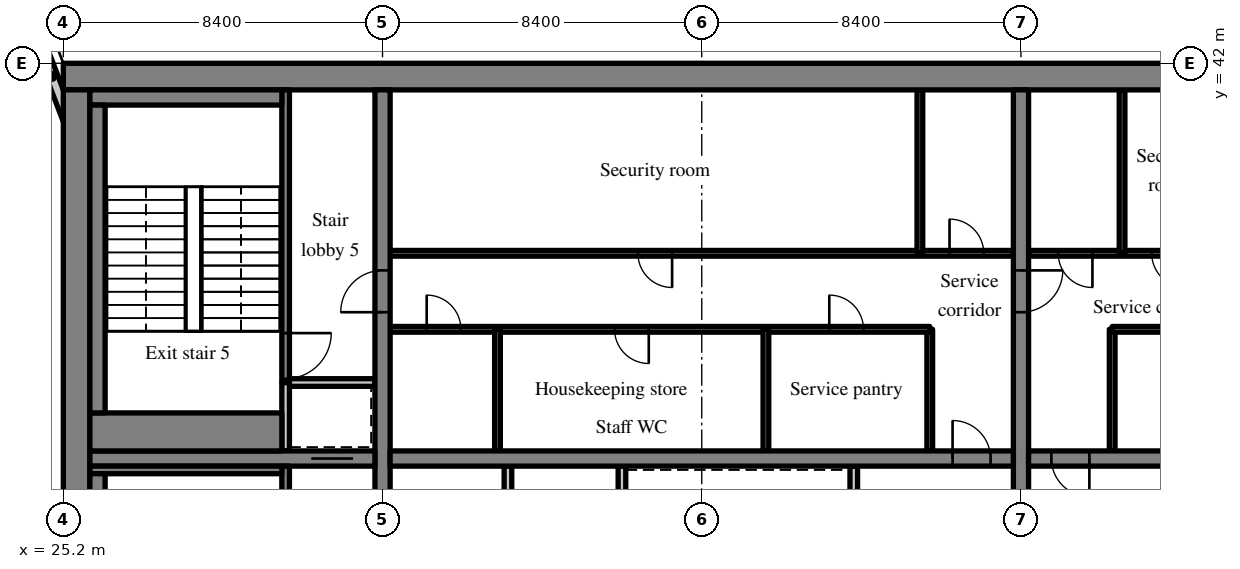
"""IFC4 building model, lengths in metres.
Left out: names, types, materials, properties, quantities, classifications, styles, units other than length and angle.
Written with IfcOpenShell. Run it as: python <this file> out.ifc"""

import sys

from ifc_helpers import new_model, si_unit, direction, frame, frame_2d, origin, place, context, subcontext, project, spatial, rectangle, extrude, source, transform, mapped, element, fill, save


model = new_model("IFC4")
c1 = context("Model", 3, precision=1e-05, world=origin(), true_north=direction((0.0, 1.0)))
c2 = subcontext(c1, "Body", "Model", "MODEL_VIEW")
j1 = project(units=[si_unit("LENGTHUNIT", "METRE"), si_unit("PLANEANGLEUNIT", "RADIAN")], contexts=[c1])
p1 = place(None, origin())
s1 = spatial("IfcSite", under=j1, at=p1, CompositionType="ELEMENT")
p2 = place(p1, origin())
s2 = spatial("IfcBuilding", under=s1, at=p2, CompositionType="ELEMENT")
p3 = place(p2, frame((0.0, 0.0, 193.4)))
s3 = spatial("IfcBuildingStorey", under=s2, at=p3, CompositionType="ELEMENT", Elevation=193.4)
m1 = source(origin(), c2, "Body", "SweptSolid", [
    extrude(rectangle(XDim=50.4, YDim=0.7, at=frame_2d((25.2, 0.0))), origin(), (0.0, 0.0, 1.0), 3.52),
])
p4 = place(p3, frame((25.2, 41.65, 0.0), z_axis=(0.0, 0.0, 1.0), x_axis=(1.0, 0.0, 0.0)))
e1 = element("IfcWall", 1, at=p4, inside=s3, PredefinedType="SHEAR", context=c2, shape_type="MappedRepresentation", body=[
    mapped(m1, transform((0.0, 0.0, 0.0), scale=1.0)),
])
m2 = source(origin(), c2, "Body", "SweptSolid", [
    extrude(rectangle(XDim=18.6, YDim=0.7, at=frame_2d((9.3, 0.0))), origin(), (0.0, 0.0, 1.0), 3.52),
])
p5 = place(p3, frame((25.55, 22.7, 0.0), z_axis=(0.0, 0.0, 1.0), x_axis=(0.0, 1.0, 0.0)))
e2 = element("IfcWall", 2, at=p5, inside=s3, PredefinedType="SHEAR", context=c2, shape_type="MappedRepresentation", body=[
    mapped(m2, transform((0.0, 0.0, 0.0), scale=1.0)),
])
m3 = source(origin(), c2, "Body", "SweptSolid", [
    extrude(rectangle(XDim=18.6, YDim=0.4, at=frame_2d((9.3, 0.0))), origin(), (0.0, 0.0, 1.0), 3.52),
])
p6 = place(p3, frame((33.6, 22.7, 0.0), z_axis=(0.0, 0.0, 1.0), x_axis=(0.0, 1.0, 0.0)))
e3 = element("IfcWall", 3, at=p6, inside=s3, PredefinedType="SHEAR", context=c2, shape_type="MappedRepresentation", body=[
    mapped(m3, transform((0.0, 0.0, 0.0), scale=1.0)),
])
m4 = source(origin(), c2, "Body", "SweptSolid", [
    extrude(rectangle(XDim=1.1, YDim=2.1, at=frame_2d((0.55, 1.05))), frame((0.0, 0.21, 0.0), z_axis=(0.0, -1.0, 0.0), x_axis=(1.0, 0.0, 0.0)), (0.0, 0.0, 1.0), 0.42),
])
p7 = place(p6, frame((12.75, 0.0, 0.0)))
e4 = element("IfcOpeningElement", 4, at=p7, cuts=e3, PredefinedType="OPENING", context=c2, shape_type="MappedRepresentation", body=[
    mapped(m4, transform((0.0, 0.0, 0.0), scale=1.0)),
])
p8 = place(p3, frame((50.4, 22.7, 0.0), z_axis=(0.0, 0.0, 1.0), x_axis=(0.0, 1.0, 0.0)))
e5 = element("IfcWall", 5, at=p8, inside=s3, PredefinedType="SHEAR", context=c2, shape_type="MappedRepresentation", body=[
    mapped(m3, transform((0.0, 0.0, 0.0), scale=1.0)),
])
p9 = place(p8, frame((12.75, 0.0, 0.0)))
e6 = element("IfcOpeningElement", 6, at=p9, cuts=e5, PredefinedType="OPENING", context=c2, shape_type="MappedRepresentation", body=[
    mapped(m4, transform((0.0, 0.0, 0.0), scale=1.0)),
])
m5 = source(origin(), c2, "Body", "SweptSolid", [
    extrude(rectangle(XDim=7.5, YDim=0.4, at=frame_2d((3.75, 0.0))), origin(), (0.0, 0.0, 1.0), 3.52),
])
p10 = place(p3, frame((25.9, 31.6, 0.0), z_axis=(0.0, 0.0, 1.0), x_axis=(1.0, 0.0, 0.0)))
e7 = element("IfcWall", 7, at=p10, inside=s3, PredefinedType="SHEAR", context=c2, shape_type="MappedRepresentation", body=[
    mapped(m5, transform((0.0, 0.0, 0.0), scale=1.0)),
])
p11 = place(p10, frame((5.825, 0.0, 0.0)))
e8 = element("IfcOpeningElement", 8, at=p11, cuts=e7, PredefinedType="OPENING", context=c2, shape_type="MappedRepresentation", body=[
    mapped(m4, transform((0.0, 0.0, 0.0), scale=1.0)),
])
m6 = source(origin(), c2, "Body", "SweptSolid", [
    extrude(rectangle(XDim=16.4, YDim=0.4, at=frame_2d((8.2, 0.0))), origin(), (0.0, 0.0, 1.0), 3.52),
])
p12 = place(p3, frame((33.8, 31.6, 0.0), z_axis=(0.0, 0.0, 1.0), x_axis=(1.0, 0.0, 0.0)))
e9 = element("IfcWall", 9, at=p12, inside=s3, PredefinedType="SHEAR", context=c2, shape_type="MappedRepresentation", body=[
    mapped(m6, transform((0.0, 0.0, 0.0), scale=1.0)),
])
m7 = source(origin(), c2, "Body", "SweptSolid", [
    extrude(rectangle(XDim=1.0, YDim=2.1, at=frame_2d((0.5, 1.05))), frame((0.0, 0.21, 0.0), z_axis=(0.0, -1.0, 0.0), x_axis=(1.0, 0.0, 0.0)), (0.0, 0.0, 1.0), 0.42),
])
p13 = place(p12, frame((14.8, 0.0, 0.0)))
e10 = element("IfcOpeningElement", 10, at=p13, cuts=e9, PredefinedType="OPENING", context=c2, shape_type="MappedRepresentation", body=[
    mapped(m7, transform((0.0, 0.0, 0.0), scale=1.0)),
])
p14 = place(p3, frame((50.6, 31.6, 0.0), z_axis=(0.0, 0.0, 1.0), x_axis=(1.0, 0.0, 0.0)))
e11 = element("IfcWall", 11, at=p14, inside=s3, PredefinedType="SHEAR", context=c2, shape_type="MappedRepresentation", body=[
    mapped(m6, transform((0.0, 0.0, 0.0), scale=1.0)),
])
p15 = place(p14, frame((0.6, 0.0, 0.0)))
e12 = element("IfcOpeningElement", 12, at=p15, cuts=e11, PredefinedType="OPENING", context=c2, shape_type="MappedRepresentation", body=[
    mapped(m7, transform((0.0, 0.0, 0.0), scale=1.0)),
])
m8 = source(origin(), c2, "Body", "SweptSolid", [
    extrude(rectangle(XDim=3.559, YDim=0.3, at=frame_2d((1.78, 0.0))), origin(), (0.0, 0.0, 1.0), 3.52),
])
p16 = place(p3, frame((25.55, 39.969, 0.0), z_axis=(0.0, 0.0, 1.0), x_axis=(-0.35779745313, 0.933799219604, 0.0)))
e13 = element("IfcWall", 13, at=p16, inside=s3, PredefinedType="SOLIDWALL", context=c2, shape_type="MappedRepresentation", body=[
    mapped(m8, transform((0.0, 0.0, 0.0), scale=1.0)),
])
m9 = source(origin(), c2, "Body", "SweptSolid", [
    extrude(rectangle(XDim=1.5, YDim=2.0, at=frame_2d((0.75, 1.0))), frame((0.0, 0.16, 0.0), z_axis=(0.0, -1.0, 0.0), x_axis=(1.0, 0.0, 0.0)), (0.0, 0.0, 1.0), 0.32),
])
p17 = place(p16, frame((1.903, 0.0, 0.9)))
e14 = element("IfcOpeningElement", 14, at=p17, cuts=e13, PredefinedType="OPENING", context=c2, shape_type="MappedRepresentation", body=[
    mapped(m9, transform((0.0, 0.0, 0.0), scale=1.0)),
])
m10 = source(origin(), c2, "Body", "SweptSolid", [
    extrude(rectangle(XDim=8.7, YDim=0.2, at=frame_2d((4.35, 0.0))), origin(), (0.0, 0.0, 1.0), 3.52),
])
p18 = place(p3, frame((39.9, 22.7, 0.0), z_axis=(0.0, 0.0, 1.0), x_axis=(0.0, 1.0, 0.0)))
e15 = element("IfcWall", 15, at=p18, inside=s3, PredefinedType="PARTITIONING", context=c2, shape_type="MappedRepresentation", body=[
    mapped(m10, transform((0.0, 0.0, 0.0), scale=1.0)),
])
m11 = source(origin(), c2, "Body", "SweptSolid", [
    extrude(rectangle(XDim=0.9, YDim=2.1, at=frame_2d((0.45, 1.05))), frame((0.0, 0.11, 0.0), z_axis=(0.0, -1.0, 0.0), x_axis=(1.0, 0.0, 0.0)), (0.0, 0.0, 1.0), 0.22),
])
p19 = place(p18, frame((3.05, 0.0, 0.0)))
e16 = element("IfcOpeningElement", 16, at=p19, cuts=e15, PredefinedType="OPENING", context=c2, shape_type="MappedRepresentation", body=[
    mapped(m11, transform((0.0, 0.0, 0.0), scale=1.0)),
])
p20 = place(p18, frame((4.85, 0.0, 0.0)))
e17 = element("IfcOpeningElement", 17, at=p20, cuts=e15, PredefinedType="OPENING", context=c2, shape_type="MappedRepresentation", body=[
    mapped(m11, transform((0.0, 0.0, 0.0), scale=1.0)),
])
m12 = source(origin(), c2, "Body", "SweptSolid", [
    extrude(rectangle(XDim=2.6, YDim=0.2, at=frame_2d((1.3, 0.0))), origin(), (0.0, 0.0, 1.0), 3.52),
])
p21 = place(p3, frame((46.0, 28.8, 0.0), z_axis=(0.0, 0.0, 1.0), x_axis=(0.0, 1.0, 0.0)))
e18 = element("IfcWall", 18, at=p21, inside=s3, PredefinedType="SOLIDWALL", context=c2, shape_type="MappedRepresentation", body=[
    mapped(m12, transform((0.0, 0.0, 0.0), scale=1.0)),
])
p22 = place(p3, frame((36.9, 22.7, 0.0), z_axis=(0.0, 0.0, 1.0), x_axis=(0.0, 1.0, 0.0)))
e19 = element("IfcWall", 19, at=p22, inside=s3, PredefinedType="PARTITIONING", context=c2, shape_type="MappedRepresentation", body=[
    mapped(m10, transform((0.0, 0.0, 0.0), scale=1.0)),
])
m13 = source(origin(), c2, "Body", "SweptSolid", [
    extrude(rectangle(XDim=3.2, YDim=0.15, at=frame_2d((1.6, 0.0))), origin(), (0.0, 0.0, 1.0), 3.52),
])
p23 = place(p3, frame((48.0, 31.8, 0.0), z_axis=(0.0, 0.0, 1.0), x_axis=(0.0, 1.0, 0.0)))
e20 = element("IfcWall", 20, at=p23, inside=s3, PredefinedType="PARTITIONING", context=c2, shape_type="MappedRepresentation", body=[
    mapped(m13, transform((0.0, 0.0, 0.0), scale=1.0)),
])
m14 = source(origin(), c2, "Body", "SweptSolid", [
    extrude(rectangle(XDim=14.2, YDim=0.15, at=frame_2d((7.1, 0.0))), origin(), (0.0, 0.0, 1.0), 3.52),
])
p24 = place(p3, frame((33.8, 35.0, 0.0), z_axis=(0.0, 0.0, 1.0), x_axis=(1.0, 0.0, 0.0)))
e21 = element("IfcWall", 21, at=p24, inside=s3, PredefinedType="PARTITIONING", context=c2, shape_type="MappedRepresentation", body=[
    mapped(m14, transform((0.0, 0.0, 0.0), scale=1.0)),
])
m15 = source(origin(), c2, "Body", "SweptSolid", [
    extrude(rectangle(XDim=0.9, YDim=2.1, at=frame_2d((0.45, 1.05))), frame((0.0, 0.085, 0.0), z_axis=(0.0, -1.0, 0.0), x_axis=(1.0, 0.0, 0.0)), (0.0, 0.0, 1.0), 0.17),
])
p25 = place(p24, frame((0.962, 0.0, 0.0)))
e22 = element("IfcOpeningElement", 22, at=p25, cuts=e21, PredefinedType="OPENING", context=c2, shape_type="MappedRepresentation", body=[
    mapped(m15, transform((0.0, 0.0, 0.0), scale=1.0)),
])
p26 = place(p24, frame((5.906, 0.0, 0.0)))
e23 = element("IfcOpeningElement", 23, at=p26, cuts=e21, PredefinedType="OPENING", context=c2, shape_type="MappedRepresentation", body=[
    mapped(m15, transform((0.0, 0.0, 0.0), scale=1.0)),
])
p27 = place(p24, frame((11.556, 0.0, 0.0)))
e24 = element("IfcOpeningElement", 24, at=p27, cuts=e21, PredefinedType="OPENING", context=c2, shape_type="MappedRepresentation", body=[
    mapped(m15, transform((0.0, 0.0, 0.0), scale=1.0)),
])
m16 = source(origin(), c2, "Body", "SweptSolid", [
    extrude(rectangle(XDim=16.4, YDim=0.15, at=frame_2d((8.2, 0.0))), origin(), (0.0, 0.0, 1.0), 3.52),
])
p28 = place(p3, frame((33.8, 37.0, 0.0), z_axis=(0.0, 0.0, 1.0), x_axis=(1.0, 0.0, 0.0)))
e25 = element("IfcWall", 25, at=p28, inside=s3, PredefinedType="PARTITIONING", context=c2, shape_type="MappedRepresentation", body=[
    mapped(m16, transform((0.0, 0.0, 0.0), scale=1.0)),
])
p29 = place(p28, frame((6.52, 0.0, 0.0)))
e26 = element("IfcOpeningElement", 26, at=p29, cuts=e25, PredefinedType="OPENING", context=c2, shape_type="MappedRepresentation", body=[
    mapped(m15, transform((0.0, 0.0, 0.0), scale=1.0)),
])
p30 = place(p28, frame((14.72, 0.0, 0.0)))
e27 = element("IfcOpeningElement", 27, at=p30, cuts=e25, PredefinedType="OPENING", context=c2, shape_type="MappedRepresentation", body=[
    mapped(m15, transform((0.0, 0.0, 0.0), scale=1.0)),
])
for number, where, z_axis, x_axis in (
    (28, (36.625, 31.8, 0.0), (0.0, 0.0, 1.0), (0.0, 1.0, 0.0)),
    (29, (43.688, 31.8, 0.0), (0.0, 0.0, 1.0), (0.0, 1.0, 0.0)),
):
    element("IfcWall", number, at=place(p3, frame(where, z_axis=z_axis, x_axis=x_axis)), inside=s3, PredefinedType="PARTITIONING", context=c2, shape_type="MappedRepresentation", body=[
        mapped(m13, transform((0.0, 0.0, 0.0), scale=1.0)),
    ])
m17 = source(origin(), c2, "Body", "SweptSolid", [
    extrude(rectangle(XDim=4.3, YDim=0.15, at=frame_2d((2.15, 0.0))), origin(), (0.0, 0.0, 1.0), 3.52),
])
p31 = place(p3, frame((47.74, 37.0, 0.0), z_axis=(0.0, 0.0, 1.0), x_axis=(0.0, 1.0, 0.0)))
e30 = element("IfcWall", 30, at=p31, inside=s3, PredefinedType="PARTITIONING", context=c2, shape_type="MappedRepresentation", body=[
    mapped(m17, transform((0.0, 0.0, 0.0), scale=1.0)),
])
p32 = place(p3, frame((52.8, 31.8, 0.0), z_axis=(0.0, 0.0, 1.0), x_axis=(0.0, 1.0, 0.0)))
e31 = element("IfcWall", 31, at=p32, inside=s3, PredefinedType="PARTITIONING", context=c2, shape_type="MappedRepresentation", body=[
    mapped(m13, transform((0.0, 0.0, 0.0), scale=1.0)),
])
p33 = place(p3, frame((67.0, 35.0, 0.0), z_axis=(0.0, 0.0, 1.0), x_axis=(-1.0, 0.0, 0.0)))
e32 = element("IfcWall", 32, at=p33, inside=s3, PredefinedType="PARTITIONING", context=c2, shape_type="MappedRepresentation", body=[
    mapped(m14, transform((0.0, 0.0, 0.0), scale=1.0)),
])
p34 = place(p33, frame((2.022, 0.0, 0.0)))
e33 = element("IfcOpeningElement", 33, at=p34, cuts=e32, PredefinedType="OPENING", context=c2, shape_type="MappedRepresentation", body=[
    mapped(m15, transform((0.0, 0.0, 0.0), scale=1.0)),
])
p35 = place(p33, frame((9.084, 0.0, 0.0)))
e34 = element("IfcOpeningElement", 34, at=p35, cuts=e32, PredefinedType="OPENING", context=c2, shape_type="MappedRepresentation", body=[
    mapped(m15, transform((0.0, 0.0, 0.0), scale=1.0)),
])
p36 = place(p3, frame((67.0, 37.0, 0.0), z_axis=(0.0, 0.0, 1.0), x_axis=(-1.0, 0.0, 0.0)))
e35 = element("IfcWall", 35, at=p36, inside=s3, PredefinedType="PARTITIONING", context=c2, shape_type="MappedRepresentation", body=[
    mapped(m16, transform((0.0, 0.0, 0.0), scale=1.0)),
])
p37 = place(p36, frame((1.6, 0.0, 0.0)))
e36 = element("IfcOpeningElement", 36, at=p37, cuts=e35, PredefinedType="OPENING", context=c2, shape_type="MappedRepresentation", body=[
    mapped(m15, transform((0.0, 0.0, 0.0), scale=1.0)),
])
p38 = place(p36, frame((7.34, 0.0, 0.0)))
e37 = element("IfcOpeningElement", 37, at=p38, cuts=e35, PredefinedType="OPENING", context=c2, shape_type="MappedRepresentation", body=[
    mapped(m15, transform((0.0, 0.0, 0.0), scale=1.0)),
])
p39 = place(p36, frame((12.26, 0.0, 0.0)))
e38 = element("IfcOpeningElement", 38, at=p39, cuts=e35, PredefinedType="OPENING", context=c2, shape_type="MappedRepresentation", body=[
    mapped(m15, transform((0.0, 0.0, 0.0), scale=1.0)),
])
p40 = place(p36, frame((14.72, 0.0, 0.0)))
e39 = element("IfcOpeningElement", 39, at=p40, cuts=e35, PredefinedType="OPENING", context=c2, shape_type="MappedRepresentation", body=[
    mapped(m15, transform((0.0, 0.0, 0.0), scale=1.0)),
])
p41 = place(p3, frame((53.06, 37.0, 0.0), z_axis=(0.0, 0.0, 1.0), x_axis=(0.0, 1.0, 0.0)))
e40 = element("IfcWall", 40, at=p41, inside=s3, PredefinedType="PARTITIONING", context=c2, shape_type="MappedRepresentation", body=[
    mapped(m17, transform((0.0, 0.0, 0.0), scale=1.0)),
])
m18 = source(origin(), c2, "Body", "SweptSolid", [
    extrude(rectangle(XDim=8.7, YDim=0.2, at=frame_2d((4.35, 0.0))), origin(), (0.0, 0.0, 1.0), 3.52),
])
p42 = place(p3, frame((31.05, 22.7, 0.0), z_axis=(0.0, 0.0, 1.0), x_axis=(0.0, 1.0, 0.0)))
e41 = element("IfcWall", 41, at=p42, inside=s3, PredefinedType="SOLIDWALL", context=c2, shape_type="MappedRepresentation", body=[
    mapped(m18, transform((0.0, 0.0, 0.0), scale=1.0)),
])
m19 = source(origin(), c2, "Body", "SweptSolid", [
    extrude(rectangle(XDim=1.2, YDim=2.1, at=frame_2d((0.6, 1.05))), frame((0.0, 0.11, 0.0), z_axis=(0.0, -1.0, 0.0), x_axis=(1.0, 0.0, 0.0)), (0.0, 0.0, 1.0), 0.22),
])
p43 = place(p42, frame((0.9, 0.0, 0.0)))
e42 = element("IfcOpeningElement", 42, at=p43, cuts=e41, PredefinedType="OPENING", context=c2, shape_type="MappedRepresentation", body=[
    mapped(m19, transform((0.0, 0.0, 0.0), scale=1.0)),
])
m20 = source(origin(), c2, "Body", "SweptSolid", [
    extrude(rectangle(XDim=1.8, YDim=0.2, at=frame_2d((0.9, 0.0))), origin(), (0.0, 0.0, 1.0), 3.52),
])
p44 = place(p3, frame((31.05, 31.8, 0.0), z_axis=(0.0, 0.0, 1.0), x_axis=(0.0, 1.0, 0.0)))
e43 = element("IfcWall", 43, at=p44, inside=s3, PredefinedType="SOLIDWALL", context=c2, shape_type="MappedRepresentation", body=[
    mapped(m20, transform((0.0, 0.0, 0.0), scale=1.0)),
])
m21 = source(origin(), c2, "Body", "SweptSolid", [
    extrude(rectangle(XDim=2.25, YDim=0.2, at=frame_2d((1.125, 0.0))), origin(), (0.0, 0.0, 1.0), 3.52),
])
p45 = place(p3, frame((31.15, 33.6, 0.0), z_axis=(0.0, 0.0, 1.0), x_axis=(1.0, 0.0, 0.0)))
e44 = element("IfcWall", 44, at=p45, inside=s3, PredefinedType="SOLIDWALL", context=c2, shape_type="MappedRepresentation", body=[
    mapped(m21, transform((0.0, 0.0, 0.0), scale=1.0)),
])
m22 = source(origin(), c2, "Body", "SweptSolid", [
    extrude(rectangle(XDim=7.7, YDim=0.2, at=frame_2d((3.85, 0.0))), origin(), (0.0, 0.0, 1.0), 3.52),
])
p46 = place(p3, frame((31.05, 33.6, 0.0), z_axis=(0.0, 0.0, 1.0), x_axis=(0.0, 1.0, 0.0)))
e45 = element("IfcWall", 45, at=p46, inside=s3, PredefinedType="SOLIDWALL", context=c2, shape_type="MappedRepresentation", body=[
    mapped(m22, transform((0.0, 0.0, 0.0), scale=1.0)),
])
p47 = place(p46, frame((0.1, 0.0, 0.0)))
e46 = element("IfcOpeningElement", 46, at=p47, cuts=e45, PredefinedType="OPENING", context=c2, shape_type="MappedRepresentation", body=[
    mapped(m19, transform((0.0, 0.0, 0.0), scale=1.0)),
])
m23 = source(origin(), c2, "Body", "SweptSolid", [
    extrude(rectangle(XDim=5.05, YDim=0.2, at=frame_2d((2.525, 0.0))), origin(), (0.0, 0.0, 1.0), 3.52),
])
p48 = place(p3, frame((25.9, 31.3, 0.0), z_axis=(0.0, 0.0, 1.0), x_axis=(1.0, 0.0, 0.0)))
e47 = element("IfcWall", 47, at=p48, inside=s3, PredefinedType="SOLIDWALL", context=c2, shape_type="MappedRepresentation", body=[
    mapped(m23, transform((0.0, 0.0, 0.0), scale=1.0)),
])
m24 = source(origin(), c2, "Body", "SweptSolid", [
    extrude(rectangle(XDim=8.1, YDim=0.4, at=frame_2d((4.05, 0.0))), origin(), (0.0, 0.0, 1.0), 3.52),
])
p49 = place(p3, frame((26.1, 23.1, 0.0), z_axis=(0.0, 0.0, 1.0), x_axis=(0.0, 1.0, 0.0)))
e48 = element("IfcWall", 48, at=p49, inside=s3, PredefinedType="SOLIDWALL", context=c2, shape_type="MappedRepresentation", body=[
    mapped(m24, transform((0.0, 0.0, 0.0), scale=1.0)),
])
m25 = source(origin(), c2, "Body", "SweptSolid", [
    extrude(rectangle(XDim=5.05, YDim=0.4, at=frame_2d((2.525, 0.0))), origin(), (0.0, 0.0, 1.0), 3.52),
])
p50 = place(p3, frame((25.9, 41.1, 0.0), z_axis=(0.0, 0.0, 1.0), x_axis=(1.0, 0.0, 0.0)))
e49 = element("IfcWall", 49, at=p50, inside=s3, PredefinedType="SOLIDWALL", context=c2, shape_type="MappedRepresentation", body=[
    mapped(m25, transform((0.0, 0.0, 0.0), scale=1.0)),
])
m26 = source(origin(), c2, "Body", "SweptSolid", [
    extrude(rectangle(XDim=5.05, YDim=1.0, at=frame_2d((2.525, 0.0))), origin(), (0.0, 0.0, 1.0), 3.52),
])
p51 = place(p3, frame((25.9, 32.3, 0.0), z_axis=(0.0, 0.0, 1.0), x_axis=(1.0, 0.0, 0.0)))
e50 = element("IfcWall", 50, at=p51, inside=s3, PredefinedType="SOLIDWALL", context=c2, shape_type="MappedRepresentation", body=[
    mapped(m26, transform((0.0, 0.0, 0.0), scale=1.0)),
])
p52 = place(p3, frame((26.1, 32.8, 0.0), z_axis=(0.0, 0.0, 1.0), x_axis=(0.0, 1.0, 0.0)))
e51 = element("IfcWall", 51, at=p52, inside=s3, PredefinedType="SOLIDWALL", context=c2, shape_type="MappedRepresentation", body=[
    mapped(m24, transform((0.0, 0.0, 0.0), scale=1.0)),
])
m27 = source(origin(), c2, "Body", "SweptSolid", [
    extrude(rectangle(XDim=1.0, YDim=2.1, at=frame_2d((0.5, 1.05))), frame((0.0, 0.025, 0.0), z_axis=(0.0, -1.0, 0.0), x_axis=(1.0, 0.0, 0.0)), (0.0, 0.0, 1.0), 0.05),
])
p53 = place(p13, origin())
e52 = element("IfcDoor", 52, at=p53, inside=s3, OperationType="SINGLE_SWING_LEFT", PredefinedType="DOOR", context=c2, shape_type="MappedRepresentation", body=[
    mapped(m27, transform((0.0, 0.0, 0.0), scale=1.0)),
])
fill(e10, e52)
m28 = source(origin(), c2, "Body", "SweptSolid", [
    extrude(rectangle(XDim=0.9, YDim=2.1, at=frame_2d((0.45, 1.05))), frame((0.0, 0.025, 0.0), z_axis=(0.0, -1.0, 0.0), x_axis=(1.0, 0.0, 0.0)), (0.0, 0.0, 1.0), 0.05),
])
p54 = place(p25, origin())
e53 = element("IfcDoor", 53, at=p54, inside=s3, OperationType="SINGLE_SWING_LEFT", PredefinedType="DOOR", context=c2, shape_type="MappedRepresentation", body=[
    mapped(m28, transform((0.0, 0.0, 0.0), scale=1.0)),
])
fill(e22, e53)
p55 = place(p26, origin())
e54 = element("IfcDoor", 54, at=p55, inside=s3, OperationType="SINGLE_SWING_RIGHT", PredefinedType="DOOR", context=c2, shape_type="MappedRepresentation", body=[
    mapped(m28, transform((0.0, 0.0, 0.0), scale=1.0)),
])
fill(e23, e54)
p56 = place(p27, origin())
e55 = element("IfcDoor", 55, at=p56, inside=s3, OperationType="SINGLE_SWING_LEFT", PredefinedType="DOOR", context=c2, shape_type="MappedRepresentation", body=[
    mapped(m28, transform((0.0, 0.0, 0.0), scale=1.0)),
])
fill(e24, e55)
p57 = place(p29, origin())
e56 = element("IfcDoor", 56, at=p57, inside=s3, OperationType="SINGLE_SWING_RIGHT", PredefinedType="DOOR", context=c2, shape_type="MappedRepresentation", body=[
    mapped(m28, transform((0.0, 0.0, 0.0), scale=1.0)),
])
fill(e26, e56)
p58 = place(p30, origin())
e57 = element("IfcDoor", 57, at=p58, inside=s3, OperationType="SINGLE_SWING_LEFT", PredefinedType="DOOR", context=c2, shape_type="MappedRepresentation", body=[
    mapped(m28, transform((0.0, 0.0, 0.0), scale=1.0)),
])
fill(e27, e57)
p59 = place(p15, origin())
e58 = element("IfcDoor", 58, at=p59, inside=s3, OperationType="SINGLE_SWING_RIGHT", PredefinedType="DOOR", context=c2, shape_type="MappedRepresentation", body=[
    mapped(m27, transform((0.0, 0.0, 0.0), scale=1.0)),
])
fill(e12, e58)
p60 = place(p39, origin())
e59 = element("IfcDoor", 59, at=p60, inside=s3, OperationType="SINGLE_SWING_LEFT", PredefinedType="DOOR", context=c2, shape_type="MappedRepresentation", body=[
    mapped(m28, transform((0.0, 0.0, 0.0), scale=1.0)),
])
fill(e38, e59)
p61 = place(p40, origin())
e60 = element("IfcDoor", 60, at=p61, inside=s3, OperationType="SINGLE_SWING_LEFT", PredefinedType="DOOR", context=c2, shape_type="MappedRepresentation", body=[
    mapped(m28, transform((0.0, 0.0, 0.0), scale=1.0)),
])
fill(e39, e60)
m29 = source(origin(), c2, "Body", "SweptSolid", [
    extrude(rectangle(XDim=1.1, YDim=2.1, at=frame_2d((0.55, 1.05))), frame((0.0, 0.025, 0.0), z_axis=(0.0, -1.0, 0.0), x_axis=(1.0, 0.0, 0.0)), (0.0, 0.0, 1.0), 0.05),
])
p62 = place(p11, origin())
e61 = element("IfcDoor", 61, at=p62, inside=s3, OperationType="SLIDING_TO_RIGHT", PredefinedType="DOOR", context=c2, shape_type="MappedRepresentation", body=[
    mapped(m29, transform((0.0, 0.0, 0.0), scale=1.0)),
])
fill(e8, e61)
m30 = source(origin(), c2, "Body", "SweptSolid", [
    extrude(rectangle(XDim=1.2, YDim=2.1, at=frame_2d((0.6, 1.05))), frame((0.0, 0.025, 0.0), z_axis=(0.0, -1.0, 0.0), x_axis=(1.0, 0.0, 0.0)), (0.0, 0.0, 1.0), 0.05),
])
p63 = place(p47, origin())
e62 = element("IfcDoor", 62, at=p63, inside=s3, OperationType="SINGLE_SWING_RIGHT", PredefinedType="DOOR", context=c2, shape_type="MappedRepresentation", body=[
    mapped(m30, transform((0.0, 0.0, 0.0), scale=1.0)),
])
fill(e46, e62)
p64 = place(p7, origin())
e63 = element("IfcDoor", 63, at=p64, inside=s3, OperationType="SINGLE_SWING_LEFT", PredefinedType="DOOR", context=c2, shape_type="MappedRepresentation", body=[
    mapped(m29, transform((0.0, 0.0, 0.0), scale=1.0)),
])
fill(e4, e63)
p65 = place(p9, origin())
e64 = element("IfcDoor", 64, at=p65, inside=s3, OperationType="SINGLE_SWING_RIGHT", PredefinedType="DOOR", context=c2, shape_type="MappedRepresentation", body=[
    mapped(m29, transform((0.0, 0.0, 0.0), scale=1.0)),
])
fill(e6, e64)
save(model, sys.argv[1])
